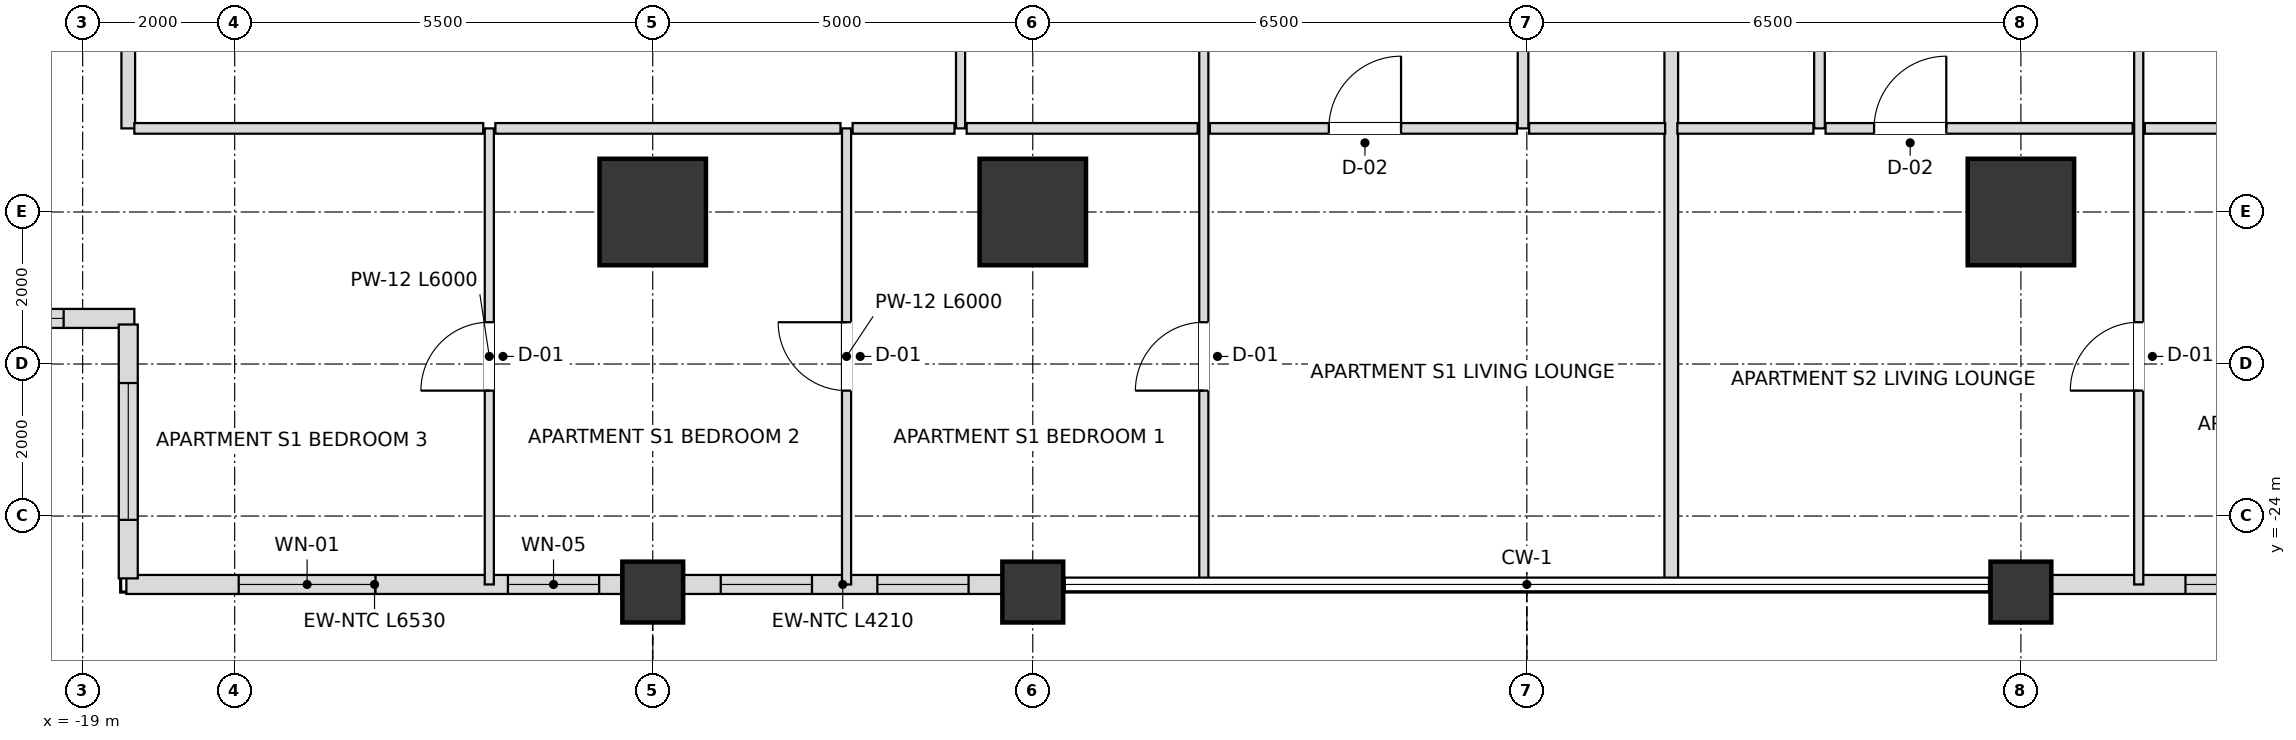
"""IFC4 building model, lengths in metres.
Left out: names, types, materials, properties, quantities, classifications, styles, units other than length and angle.
Written with IfcOpenShell. Run it as: python <this file> out.ifc"""

import sys

from ifc_helpers import new_model, si_unit, direction, frame, frame_2d, origin, origin_2d, place, context, subcontext, project, spatial, rectangle, extrude, element, fill, save


model = new_model("IFC4")
c1 = context("Model", 3, precision=1e-05, world=origin(), true_north=direction((0.0, 1.0)))
c2 = subcontext(c1, "Body", "Model", "MODEL_VIEW")
j1 = project(units=[si_unit("LENGTHUNIT", "METRE"), si_unit("PLANEANGLEUNIT", "RADIAN")], contexts=[c1])
p1 = place(None, origin())
s1 = spatial("IfcSite", under=j1, at=p1, CompositionType="ELEMENT")
p2 = place(p1, origin())
s2 = spatial("IfcBuilding", under=s1, at=p2, CompositionType="ELEMENT")
p3 = place(p2, frame((0.0, 0.0, 50.4)))
s3 = spatial("IfcBuildingStorey", under=s2, at=p3, CompositionType="ELEMENT", Elevation=50.4)
for number, where, z_axis, x_axis in (
    (1, (-11.5, -20.0, 0.0), (0.0, 0.0, 1.0), (1.0, 0.0, 0.0)),
    (2, (-6.5, -20.0, 0.0), (0.0, 0.0, 1.0), (1.0, 0.0, 0.0)),
    (3, (6.5, -20.0, 0.0), (0.0, 0.0, 1.0), (1.0, 0.0, 0.0)),
):
    element("IfcColumn", number, at=place(p3, frame(where, z_axis=z_axis, x_axis=x_axis)), inside=s3, PredefinedType="USERDEFINED", context=c2, shape_type="SweptSolid", body=[
        extrude(rectangle(XDim=1.4, YDim=1.4, at=origin_2d()), origin(), (0.0, 0.0, 1.0), 3.6),
    ])
for number, where, z_axis, x_axis in (
    (4, (-11.5, -25.0, 0.0), (0.0, 0.0, 1.0), (1.0, 0.0, 0.0)),
    (5, (-6.5, -25.0, 0.0), (0.0, 0.0, 1.0), (1.0, 0.0, 0.0)),
    (6, (6.5, -25.0, 0.0), (0.0, 0.0, 1.0), (1.0, 0.0, 0.0)),
):
    element("IfcColumn", number, at=place(p3, frame(where, z_axis=z_axis, x_axis=x_axis)), inside=s3, PredefinedType="COLUMN", context=c2, shape_type="SweptSolid", body=[
        extrude(rectangle(XDim=0.8, YDim=0.8, at=origin_2d()), origin(), (0.0, 0.0, 1.0), 3.6),
    ])
p4 = place(p3, frame((-18.425, -24.9, 0.0), z_axis=(0.0, 0.0, 1.0), x_axis=(1.0, 0.0, 0.0)))
e7 = element("IfcWall", 7, at=p4, inside=s3, PredefinedType="SOLIDWALL", context=c2, shape_type="SweptSolid", body=[
    extrude(rectangle(XDim=6.53, YDim=0.25, at=frame_2d((3.265, 0.0))), origin(), (0.0, 0.0, 1.0), 2.736),
])
p5 = place(p4, frame((1.478, 0.0, 0.72)))
e8 = element("IfcOpeningElement", 8, at=p5, cuts=e7, PredefinedType="OPENING", context=c2, shape_type="SweptSolid", body=[
    extrude(rectangle(XDim=1.8, YDim=1.68, at=frame_2d((0.9, 0.84))), frame((0.0, 0.135, 0.0), z_axis=(0.0, -1.0, 0.0), x_axis=(1.0, 0.0, 0.0)), (0.0, 0.0, 1.0), 0.27),
])
p6 = place(p4, frame((5.02, 0.0, 0.72)))
e9 = element("IfcOpeningElement", 9, at=p6, cuts=e7, PredefinedType="OPENING", context=c2, shape_type="SweptSolid", body=[
    extrude(rectangle(XDim=1.2, YDim=1.68, at=frame_2d((0.6, 0.84))), frame((0.0, 0.135, 0.0), z_axis=(0.0, -1.0, 0.0), x_axis=(1.0, 0.0, 0.0)), (0.0, 0.0, 1.0), 0.27),
])
p7 = place(p3, frame((-11.105, -24.9, 0.0), z_axis=(0.0, 0.0, 1.0), x_axis=(1.0, 0.0, 0.0)))
e10 = element("IfcWall", 10, at=p7, inside=s3, PredefinedType="SOLIDWALL", context=c2, shape_type="SweptSolid", body=[
    extrude(rectangle(XDim=4.21, YDim=0.25, at=frame_2d((2.105, 0.0))), origin(), (0.0, 0.0, 1.0), 2.736),
])
p8 = place(p7, frame((0.5, 0.0, 0.72)))
e11 = element("IfcOpeningElement", 11, at=p8, cuts=e10, PredefinedType="OPENING", context=c2, shape_type="SweptSolid", body=[
    extrude(rectangle(XDim=1.2, YDim=1.68, at=frame_2d((0.6, 0.84))), frame((0.0, 0.135, 0.0), z_axis=(0.0, -1.0, 0.0), x_axis=(1.0, 0.0, 0.0)), (0.0, 0.0, 1.0), 0.27),
])
p9 = place(p7, frame((2.56, 0.0, 0.72)))
e12 = element("IfcOpeningElement", 12, at=p9, cuts=e10, PredefinedType="OPENING", context=c2, shape_type="SweptSolid", body=[
    extrude(rectangle(XDim=1.2, YDim=1.68, at=frame_2d((0.6, 0.84))), frame((0.0, 0.135, 0.0), z_axis=(0.0, -1.0, 0.0), x_axis=(1.0, 0.0, 0.0)), (0.0, 0.0, 1.0), 0.27),
])
p10 = place(p3, frame((6.895, -24.9, 0.0), z_axis=(0.0, 0.0, 1.0), x_axis=(1.0, 0.0, 0.0)))
e13 = element("IfcWall", 13, at=p10, inside=s3, PredefinedType="SOLIDWALL", context=c2, shape_type="SweptSolid", body=[
    extrude(rectangle(XDim=4.21, YDim=0.25, at=frame_2d((2.105, 0.0))), origin(), (0.0, 0.0, 1.0), 2.736),
])
p11 = place(p10, frame((1.77, 0.0, 0.72)))
e14 = element("IfcOpeningElement", 14, at=p11, cuts=e13, PredefinedType="OPENING", context=c2, shape_type="SweptSolid", body=[
    extrude(rectangle(XDim=1.8, YDim=1.68, at=frame_2d((0.9, 0.84))), frame((0.0, 0.135, 0.0), z_axis=(0.0, -1.0, 0.0), x_axis=(1.0, 0.0, 0.0)), (0.0, 0.0, 1.0), 0.27),
])
p12 = place(p3, frame((-21.98, -21.4, 0.0), z_axis=(0.0, 0.0, 1.0), x_axis=(1.0, 0.0, 0.0)))
e15 = element("IfcWall", 15, at=p12, inside=s3, PredefinedType="SOLIDWALL", context=c2, shape_type="SweptSolid", body=[
    extrude(rectangle(XDim=3.66, YDim=0.25, at=frame_2d((1.83, 0.0))), origin(), (0.0, 0.0, 1.0), 2.736),
])
p13 = place(p12, frame((0.93, 0.0, 0.72)))
e16 = element("IfcOpeningElement", 16, at=p13, cuts=e15, PredefinedType="OPENING", context=c2, shape_type="SweptSolid", body=[
    extrude(rectangle(XDim=1.8, YDim=1.68, at=frame_2d((0.9, 0.84))), frame((0.0, 0.135, 0.0), z_axis=(0.0, -1.0, 0.0), x_axis=(1.0, 0.0, 0.0)), (0.0, 0.0, 1.0), 0.27),
])
p14 = place(p3, frame((-18.4, -21.48, 0.0), z_axis=(0.0, 0.0, 1.0), x_axis=(0.0, -1.0, 0.0)))
e17 = element("IfcWall", 17, at=p14, inside=s3, PredefinedType="SOLIDWALL", context=c2, shape_type="SweptSolid", body=[
    extrude(rectangle(XDim=3.34, YDim=0.25, at=frame_2d((1.67, 0.0))), origin(), (0.0, 0.0, 1.0), 2.736),
])
p15 = place(p14, frame((0.77, 0.0, 0.72)))
e18 = element("IfcOpeningElement", 18, at=p15, cuts=e17, PredefinedType="OPENING", context=c2, shape_type="SweptSolid", body=[
    extrude(rectangle(XDim=1.8, YDim=1.68, at=frame_2d((0.9, 0.84))), frame((0.0, 0.135, 0.0), z_axis=(0.0, -1.0, 0.0), x_axis=(1.0, 0.0, 0.0)), (0.0, 0.0, 1.0), 0.27),
])
p16 = place(p3, frame((-18.4, -18.9, 0.0), z_axis=(0.0, 0.0, 1.0), x_axis=(0.0, 1.0, 0.0)))
e19 = element("IfcWall", 19, at=p16, inside=s3, PredefinedType="PARTITIONING", context=c2, shape_type="SweptSolid", body=[
    extrude(rectangle(XDim=9.6, YDim=0.18, at=frame_2d((4.8, 0.0))), origin(), (0.0, 0.0, 1.0), 2.736),
])
p17 = place(p3, frame((-13.65, -24.9, 0.0), z_axis=(0.0, 0.0, 1.0), x_axis=(0.0, 1.0, 0.0)))
e20 = element("IfcWall", 20, at=p17, inside=s3, PredefinedType="PARTITIONING", context=c2, shape_type="SweptSolid", body=[
    extrude(rectangle(XDim=6.0, YDim=0.12, at=frame_2d((3.0, 0.0))), origin(), (0.0, 0.0, 1.0), 2.736),
])
p18 = place(p17, frame((2.55, 0.0, 0.0)))
e21 = element("IfcOpeningElement", 21, at=p18, cuts=e20, PredefinedType="OPENING", context=c2, shape_type="SweptSolid", body=[
    extrude(rectangle(XDim=0.9, YDim=2.1, at=frame_2d((0.45, 1.05))), frame((0.0, 0.07, 0.0), z_axis=(0.0, -1.0, 0.0), x_axis=(1.0, 0.0, 0.0)), (0.0, 0.0, 1.0), 0.14),
])
p19 = place(p3, frame((-8.95, -24.9, 0.0), z_axis=(0.0, 0.0, 1.0), x_axis=(0.0, 1.0, 0.0)))
e22 = element("IfcWall", 22, at=p19, inside=s3, PredefinedType="PARTITIONING", context=c2, shape_type="SweptSolid", body=[
    extrude(rectangle(XDim=6.0, YDim=0.12, at=frame_2d((3.0, 0.0))), origin(), (0.0, 0.0, 1.0), 2.816),
])
p20 = place(p19, frame((2.55, 0.0, 0.0)))
e23 = element("IfcOpeningElement", 23, at=p20, cuts=e22, PredefinedType="OPENING", context=c2, shape_type="SweptSolid", body=[
    extrude(rectangle(XDim=0.9, YDim=2.1, at=frame_2d((0.45, 1.05))), frame((0.0, 0.07, 0.0), z_axis=(0.0, -1.0, 0.0), x_axis=(1.0, 0.0, 0.0)), (0.0, 0.0, 1.0), 0.14),
])
p21 = place(p3, frame((-7.45, -18.9, 0.0), z_axis=(0.0, 0.0, 1.0), x_axis=(0.0, 1.0, 0.0)))
e24 = element("IfcWall", 24, at=p21, inside=s3, PredefinedType="PARTITIONING", context=c2, shape_type="SweptSolid", body=[
    extrude(rectangle(XDim=9.6, YDim=0.12, at=frame_2d((4.8, 0.0))), origin(), (0.0, 0.0, 1.0), 2.816),
])
p22 = place(p21, frame((4.35, 0.0, 0.0)))
e25 = element("IfcOpeningElement", 25, at=p22, cuts=e24, PredefinedType="OPENING", context=c2, shape_type="SweptSolid", body=[
    extrude(rectangle(XDim=0.9, YDim=2.1, at=frame_2d((0.45, 1.05))), frame((0.0, 0.07, 0.0), z_axis=(0.0, -1.0, 0.0), x_axis=(1.0, 0.0, 0.0)), (0.0, 0.0, 1.0), 0.14),
])
p23 = place(p3, frame((-4.25, -24.9, 0.0), z_axis=(0.0, 0.0, 1.0), x_axis=(0.0, 1.0, 0.0)))
e26 = element("IfcWall", 26, at=p23, inside=s3, PredefinedType="PARTITIONING", context=c2, shape_type="SweptSolid", body=[
    extrude(rectangle(XDim=15.6, YDim=0.12, at=frame_2d((7.8, 0.0))), origin(), (0.0, 0.0, 1.0), 2.816),
])
p24 = place(p23, frame((10.325, 0.0, 0.0)))
e27 = element("IfcOpeningElement", 27, at=p24, cuts=e26, PredefinedType="OPENING", context=c2, shape_type="SweptSolid", body=[
    extrude(rectangle(XDim=0.95, YDim=2.1, at=frame_2d((0.475, 1.05))), frame((0.0, 0.07, 0.0), z_axis=(0.0, -1.0, 0.0), x_axis=(1.0, 0.0, 0.0)), (0.0, 0.0, 1.0), 0.14),
])
p25 = place(p23, frame((2.55, 0.0, 0.0)))
e28 = element("IfcOpeningElement", 28, at=p25, cuts=e26, PredefinedType="OPENING", context=c2, shape_type="SweptSolid", body=[
    extrude(rectangle(XDim=0.9, YDim=2.1, at=frame_2d((0.45, 1.05))), frame((0.0, 0.07, 0.0), z_axis=(0.0, -1.0, 0.0), x_axis=(1.0, 0.0, 0.0)), (0.0, 0.0, 1.0), 0.14),
])
p26 = place(p3, frame((-0.05, -18.9, 0.0), z_axis=(0.0, 0.0, 1.0), x_axis=(0.0, 1.0, 0.0)))
e29 = element("IfcWall", 29, at=p26, inside=s3, PredefinedType="PARTITIONING", context=c2, shape_type="SweptSolid", body=[
    extrude(rectangle(XDim=9.6, YDim=0.14, at=frame_2d((4.8, 0.0))), origin(), (0.0, 0.0, 1.0), 2.948),
])
p27 = place(p26, frame((4.35, 0.0, 0.0)))
e30 = element("IfcOpeningElement", 30, at=p27, cuts=e29, PredefinedType="OPENING", context=c2, shape_type="SweptSolid", body=[
    extrude(rectangle(XDim=0.9, YDim=2.1, at=frame_2d((0.45, 1.05))), frame((0.0, 0.08, 0.0), z_axis=(0.0, -1.0, 0.0), x_axis=(1.0, 0.0, 0.0)), (0.0, 0.0, 1.0), 0.16),
])
p28 = place(p3, frame((1.9, -24.9, 0.0), z_axis=(0.0, 0.0, 1.0), x_axis=(0.0, 1.0, 0.0)))
e31 = element("IfcWall", 31, at=p28, inside=s3, PredefinedType="PARTITIONING", context=c2, shape_type="SweptSolid", body=[
    extrude(rectangle(XDim=15.6, YDim=0.18, at=frame_2d((7.8, 0.0))), origin(), (0.0, 0.0, 1.0), 2.816),
])
p29 = place(p3, frame((3.85, -18.9, 0.0), z_axis=(0.0, 0.0, 1.0), x_axis=(0.0, 1.0, 0.0)))
e32 = element("IfcWall", 32, at=p29, inside=s3, PredefinedType="PARTITIONING", context=c2, shape_type="SweptSolid", body=[
    extrude(rectangle(XDim=9.6, YDim=0.14, at=frame_2d((4.8, 0.0))), origin(), (0.0, 0.0, 1.0), 2.948),
])
p30 = place(p29, frame((4.35, 0.0, 0.0)))
e33 = element("IfcOpeningElement", 33, at=p30, cuts=e32, PredefinedType="OPENING", context=c2, shape_type="SweptSolid", body=[
    extrude(rectangle(XDim=0.9, YDim=2.1, at=frame_2d((0.45, 1.05))), frame((0.0, 0.08, 0.0), z_axis=(0.0, -1.0, 0.0), x_axis=(1.0, 0.0, 0.0)), (0.0, 0.0, 1.0), 0.16),
])
p31 = place(p3, frame((8.05, -24.9, 0.0), z_axis=(0.0, 0.0, 1.0), x_axis=(0.0, 1.0, 0.0)))
e34 = element("IfcWall", 34, at=p31, inside=s3, PredefinedType="PARTITIONING", context=c2, shape_type="SweptSolid", body=[
    extrude(rectangle(XDim=15.6, YDim=0.12, at=frame_2d((7.8, 0.0))), origin(), (0.0, 0.0, 1.0), 2.816),
])
p32 = place(p31, frame((10.325, 0.0, 0.0)))
e35 = element("IfcOpeningElement", 35, at=p32, cuts=e34, PredefinedType="OPENING", context=c2, shape_type="SweptSolid", body=[
    extrude(rectangle(XDim=0.95, YDim=2.1, at=frame_2d((0.475, 1.05))), frame((0.0, 0.07, 0.0), z_axis=(0.0, -1.0, 0.0), x_axis=(1.0, 0.0, 0.0)), (0.0, 0.0, 1.0), 0.14),
])
p33 = place(p31, frame((2.55, 0.0, 0.0)))
e36 = element("IfcOpeningElement", 36, at=p33, cuts=e34, PredefinedType="OPENING", context=c2, shape_type="SweptSolid", body=[
    extrude(rectangle(XDim=0.9, YDim=2.1, at=frame_2d((0.45, 1.05))), frame((0.0, 0.07, 0.0), z_axis=(0.0, -1.0, 0.0), x_axis=(1.0, 0.0, 0.0)), (0.0, 0.0, 1.0), 0.14),
])
p34 = place(p3, frame((-18.32, -18.9, 0.0), z_axis=(0.0, 0.0, 1.0), x_axis=(1.0, 0.0, 0.0)))
e37 = element("IfcWall", 37, at=p34, inside=s3, PredefinedType="PARTITIONING", context=c2, shape_type="SweptSolid", body=[
    extrude(rectangle(XDim=4.59, YDim=0.14, at=frame_2d((2.295, 0.0))), origin(), (0.0, 0.0, 1.0), 2.736),
])
p35 = place(p3, frame((-13.57, -18.9, 0.0), z_axis=(0.0, 0.0, 1.0), x_axis=(1.0, 0.0, 0.0)))
e38 = element("IfcWall", 38, at=p35, inside=s3, PredefinedType="PARTITIONING", context=c2, shape_type="SweptSolid", body=[
    extrude(rectangle(XDim=4.54, YDim=0.14, at=frame_2d((2.27, 0.0))), origin(), (0.0, 0.0, 1.0), 2.736),
])
p36 = place(p3, frame((-8.87, -18.9, 0.0), z_axis=(0.0, 0.0, 1.0), x_axis=(1.0, 0.0, 0.0)))
e39 = element("IfcWall", 39, at=p36, inside=s3, PredefinedType="PARTITIONING", context=c2, shape_type="SweptSolid", body=[
    extrude(rectangle(XDim=1.34, YDim=0.14, at=frame_2d((0.67, 0.0))), origin(), (0.0, 0.0, 1.0), 3.38),
])
p37 = place(p3, frame((-7.37, -18.9, 0.0), z_axis=(0.0, 0.0, 1.0), x_axis=(1.0, 0.0, 0.0)))
e40 = element("IfcWall", 40, at=p37, inside=s3, PredefinedType="PARTITIONING", context=c2, shape_type="SweptSolid", body=[
    extrude(rectangle(XDim=3.04, YDim=0.14, at=frame_2d((1.52, 0.0))), origin(), (0.0, 0.0, 1.0), 2.816),
])
p38 = place(p3, frame((-4.17, -18.9, 0.0), z_axis=(0.0, 0.0, 1.0), x_axis=(1.0, 0.0, 0.0)))
e41 = element("IfcWall", 41, at=p38, inside=s3, PredefinedType="PARTITIONING", context=c2, shape_type="SweptSolid", body=[
    extrude(rectangle(XDim=4.04, YDim=0.14, at=frame_2d((2.02, 0.0))), origin(), (0.0, 0.0, 1.0), 3.38),
])
p39 = place(p38, frame((1.565, 0.0, 0.0)))
e42 = element("IfcOpeningElement", 42, at=p39, cuts=e41, PredefinedType="OPENING", context=c2, shape_type="SweptSolid", body=[
    extrude(rectangle(XDim=0.95, YDim=2.1, at=frame_2d((0.475, 1.05))), frame((0.0, 0.08, 0.0), z_axis=(0.0, -1.0, 0.0), x_axis=(1.0, 0.0, 0.0)), (0.0, 0.0, 1.0), 0.16),
])
for number, where, z_axis, x_axis in (
    (43, (0.03, -18.9, 0.0), (0.0, 0.0, 1.0), (1.0, 0.0, 0.0)),
    (44, (1.98, -18.9, 0.0), (0.0, 0.0, 1.0), (1.0, 0.0, 0.0)),
):
    element("IfcWall", number, at=place(p3, frame(where, z_axis=z_axis, x_axis=x_axis)), inside=s3, PredefinedType="PARTITIONING", context=c2, shape_type="SweptSolid", body=[
        extrude(rectangle(XDim=1.79, YDim=0.14, at=frame_2d((0.895, 0.0))), origin(), (0.0, 0.0, 1.0), 3.38),
    ])
p40 = place(p3, frame((3.93, -18.9, 0.0), z_axis=(0.0, 0.0, 1.0), x_axis=(1.0, 0.0, 0.0)))
e45 = element("IfcWall", 45, at=p40, inside=s3, PredefinedType="PARTITIONING", context=c2, shape_type="SweptSolid", body=[
    extrude(rectangle(XDim=4.04, YDim=0.14, at=frame_2d((2.02, 0.0))), origin(), (0.0, 0.0, 1.0), 2.816),
])
p41 = place(p40, frame((0.638, 0.0, 0.0)))
e46 = element("IfcOpeningElement", 46, at=p41, cuts=e45, PredefinedType="OPENING", context=c2, shape_type="SweptSolid", body=[
    extrude(rectangle(XDim=0.95, YDim=2.1, at=frame_2d((0.475, 1.05))), frame((0.0, 0.08, 0.0), z_axis=(0.0, -1.0, 0.0), x_axis=(1.0, 0.0, 0.0)), (0.0, 0.0, 1.0), 0.16),
])
p42 = place(p3, frame((8.13, -18.9, 0.0), z_axis=(0.0, 0.0, 1.0), x_axis=(1.0, 0.0, 0.0)))
e47 = element("IfcWall", 47, at=p42, inside=s3, PredefinedType="PARTITIONING", context=c2, shape_type="SweptSolid", body=[
    extrude(rectangle(XDim=3.04, YDim=0.14, at=frame_2d((1.52, 0.0))), origin(), (0.0, 0.0, 1.0), 3.38),
])
p43 = place(p5, origin())
e48 = element("IfcWindow", 48, at=p43, inside=s3, PartitioningType="SINGLE_PANEL", PredefinedType="WINDOW", context=c2, shape_type="SweptSolid", body=[
    extrude(rectangle(XDim=1.8, YDim=1.68, at=frame_2d((0.9, 0.84))), frame((0.0, 0.03, 0.0), z_axis=(0.0, -1.0, 0.0), x_axis=(1.0, 0.0, 0.0)), (0.0, 0.0, 1.0), 0.06),
])
fill(e8, e48)
p44 = place(p6, origin())
e49 = element("IfcWindow", 49, at=p44, inside=s3, PartitioningType="SINGLE_PANEL", PredefinedType="WINDOW", context=c2, shape_type="SweptSolid", body=[
    extrude(rectangle(XDim=1.2, YDim=1.68, at=frame_2d((0.6, 0.84))), frame((0.0, 0.03, 0.0), z_axis=(0.0, -1.0, 0.0), x_axis=(1.0, 0.0, 0.0)), (0.0, 0.0, 1.0), 0.06),
])
fill(e9, e49)
p45 = place(p8, origin())
e50 = element("IfcWindow", 50, at=p45, inside=s3, PartitioningType="SINGLE_PANEL", PredefinedType="WINDOW", context=c2, shape_type="SweptSolid", body=[
    extrude(rectangle(XDim=1.2, YDim=1.68, at=frame_2d((0.6, 0.84))), frame((0.0, 0.03, 0.0), z_axis=(0.0, -1.0, 0.0), x_axis=(1.0, 0.0, 0.0)), (0.0, 0.0, 1.0), 0.06),
])
fill(e11, e50)
p46 = place(p9, origin())
e51 = element("IfcWindow", 51, at=p46, inside=s3, PartitioningType="SINGLE_PANEL", PredefinedType="WINDOW", context=c2, shape_type="SweptSolid", body=[
    extrude(rectangle(XDim=1.2, YDim=1.68, at=frame_2d((0.6, 0.84))), frame((0.0, 0.03, 0.0), z_axis=(0.0, -1.0, 0.0), x_axis=(1.0, 0.0, 0.0)), (0.0, 0.0, 1.0), 0.06),
])
fill(e12, e51)
p47 = place(p11, origin())
e52 = element("IfcWindow", 52, at=p47, inside=s3, PartitioningType="SINGLE_PANEL", PredefinedType="WINDOW", context=c2, shape_type="SweptSolid", body=[
    extrude(rectangle(XDim=1.8, YDim=1.68, at=frame_2d((0.9, 0.84))), frame((0.0, 0.03, 0.0), z_axis=(0.0, -1.0, 0.0), x_axis=(1.0, 0.0, 0.0)), (0.0, 0.0, 1.0), 0.06),
])
fill(e14, e52)
p48 = place(p13, origin())
e53 = element("IfcWindow", 53, at=p48, inside=s3, PartitioningType="SINGLE_PANEL", PredefinedType="WINDOW", context=c2, shape_type="SweptSolid", body=[
    extrude(rectangle(XDim=1.8, YDim=1.68, at=frame_2d((0.9, 0.84))), frame((0.0, 0.03, 0.0), z_axis=(0.0, -1.0, 0.0), x_axis=(1.0, 0.0, 0.0)), (0.0, 0.0, 1.0), 0.06),
])
fill(e16, e53)
p49 = place(p15, origin())
e54 = element("IfcWindow", 54, at=p49, inside=s3, PartitioningType="SINGLE_PANEL", PredefinedType="WINDOW", context=c2, shape_type="SweptSolid", body=[
    extrude(rectangle(XDim=1.8, YDim=1.68, at=frame_2d((0.9, 0.84))), frame((0.0, 0.03, 0.0), z_axis=(0.0, -1.0, 0.0), x_axis=(1.0, 0.0, 0.0)), (0.0, 0.0, 1.0), 0.06),
])
fill(e18, e54)
p50 = place(p39, origin())
e55 = element("IfcDoor", 55, at=p50, inside=s3, OperationType="SINGLE_SWING_RIGHT", PredefinedType="DOOR", context=c2, shape_type="SweptSolid", body=[
    extrude(rectangle(XDim=0.95, YDim=2.1, at=frame_2d((0.475, 1.05))), frame((0.0, 0.025, 0.0), z_axis=(0.0, -1.0, 0.0), x_axis=(1.0, 0.0, 0.0)), (0.0, 0.0, 1.0), 0.05),
])
fill(e42, e55)
p51 = place(p25, origin())
e56 = element("IfcDoor", 56, at=p51, inside=s3, OperationType="SINGLE_SWING_LEFT", PredefinedType="DOOR", context=c2, shape_type="SweptSolid", body=[
    extrude(rectangle(XDim=0.9, YDim=2.1, at=frame_2d((0.45, 1.05))), frame((0.0, 0.025, 0.0), z_axis=(0.0, -1.0, 0.0), x_axis=(1.0, 0.0, 0.0)), (0.0, 0.0, 1.0), 0.05),
])
fill(e28, e56)
p52 = place(p20, origin())
e57 = element("IfcDoor", 57, at=p52, inside=s3, OperationType="SINGLE_SWING_RIGHT", PredefinedType="DOOR", context=c2, shape_type="SweptSolid", body=[
    extrude(rectangle(XDim=0.9, YDim=2.1, at=frame_2d((0.45, 1.05))), frame((0.0, 0.025, 0.0), z_axis=(0.0, -1.0, 0.0), x_axis=(1.0, 0.0, 0.0)), (0.0, 0.0, 1.0), 0.05),
])
fill(e23, e57)
p53 = place(p18, origin())
e58 = element("IfcDoor", 58, at=p53, inside=s3, OperationType="SINGLE_SWING_LEFT", PredefinedType="DOOR", context=c2, shape_type="SweptSolid", body=[
    extrude(rectangle(XDim=0.9, YDim=2.1, at=frame_2d((0.45, 1.05))), frame((0.0, 0.025, 0.0), z_axis=(0.0, -1.0, 0.0), x_axis=(1.0, 0.0, 0.0)), (0.0, 0.0, 1.0), 0.05),
])
fill(e21, e58)
p54 = place(p41, origin())
e59 = element("IfcDoor", 59, at=p54, inside=s3, OperationType="SINGLE_SWING_RIGHT", PredefinedType="DOOR", context=c2, shape_type="SweptSolid", body=[
    extrude(rectangle(XDim=0.95, YDim=2.1, at=frame_2d((0.475, 1.05))), frame((0.0, 0.025, 0.0), z_axis=(0.0, -1.0, 0.0), x_axis=(1.0, 0.0, 0.0)), (0.0, 0.0, 1.0), 0.05),
])
fill(e46, e59)
p55 = place(p33, origin())
e60 = element("IfcDoor", 60, at=p55, inside=s3, OperationType="SINGLE_SWING_LEFT", PredefinedType="DOOR", context=c2, shape_type="SweptSolid", body=[
    extrude(rectangle(XDim=0.9, YDim=2.1, at=frame_2d((0.45, 1.05))), frame((0.0, 0.025, 0.0), z_axis=(0.0, -1.0, 0.0), x_axis=(1.0, 0.0, 0.0)), (0.0, 0.0, 1.0), 0.05),
])
fill(e36, e60)
save(model, sys.argv[1])
